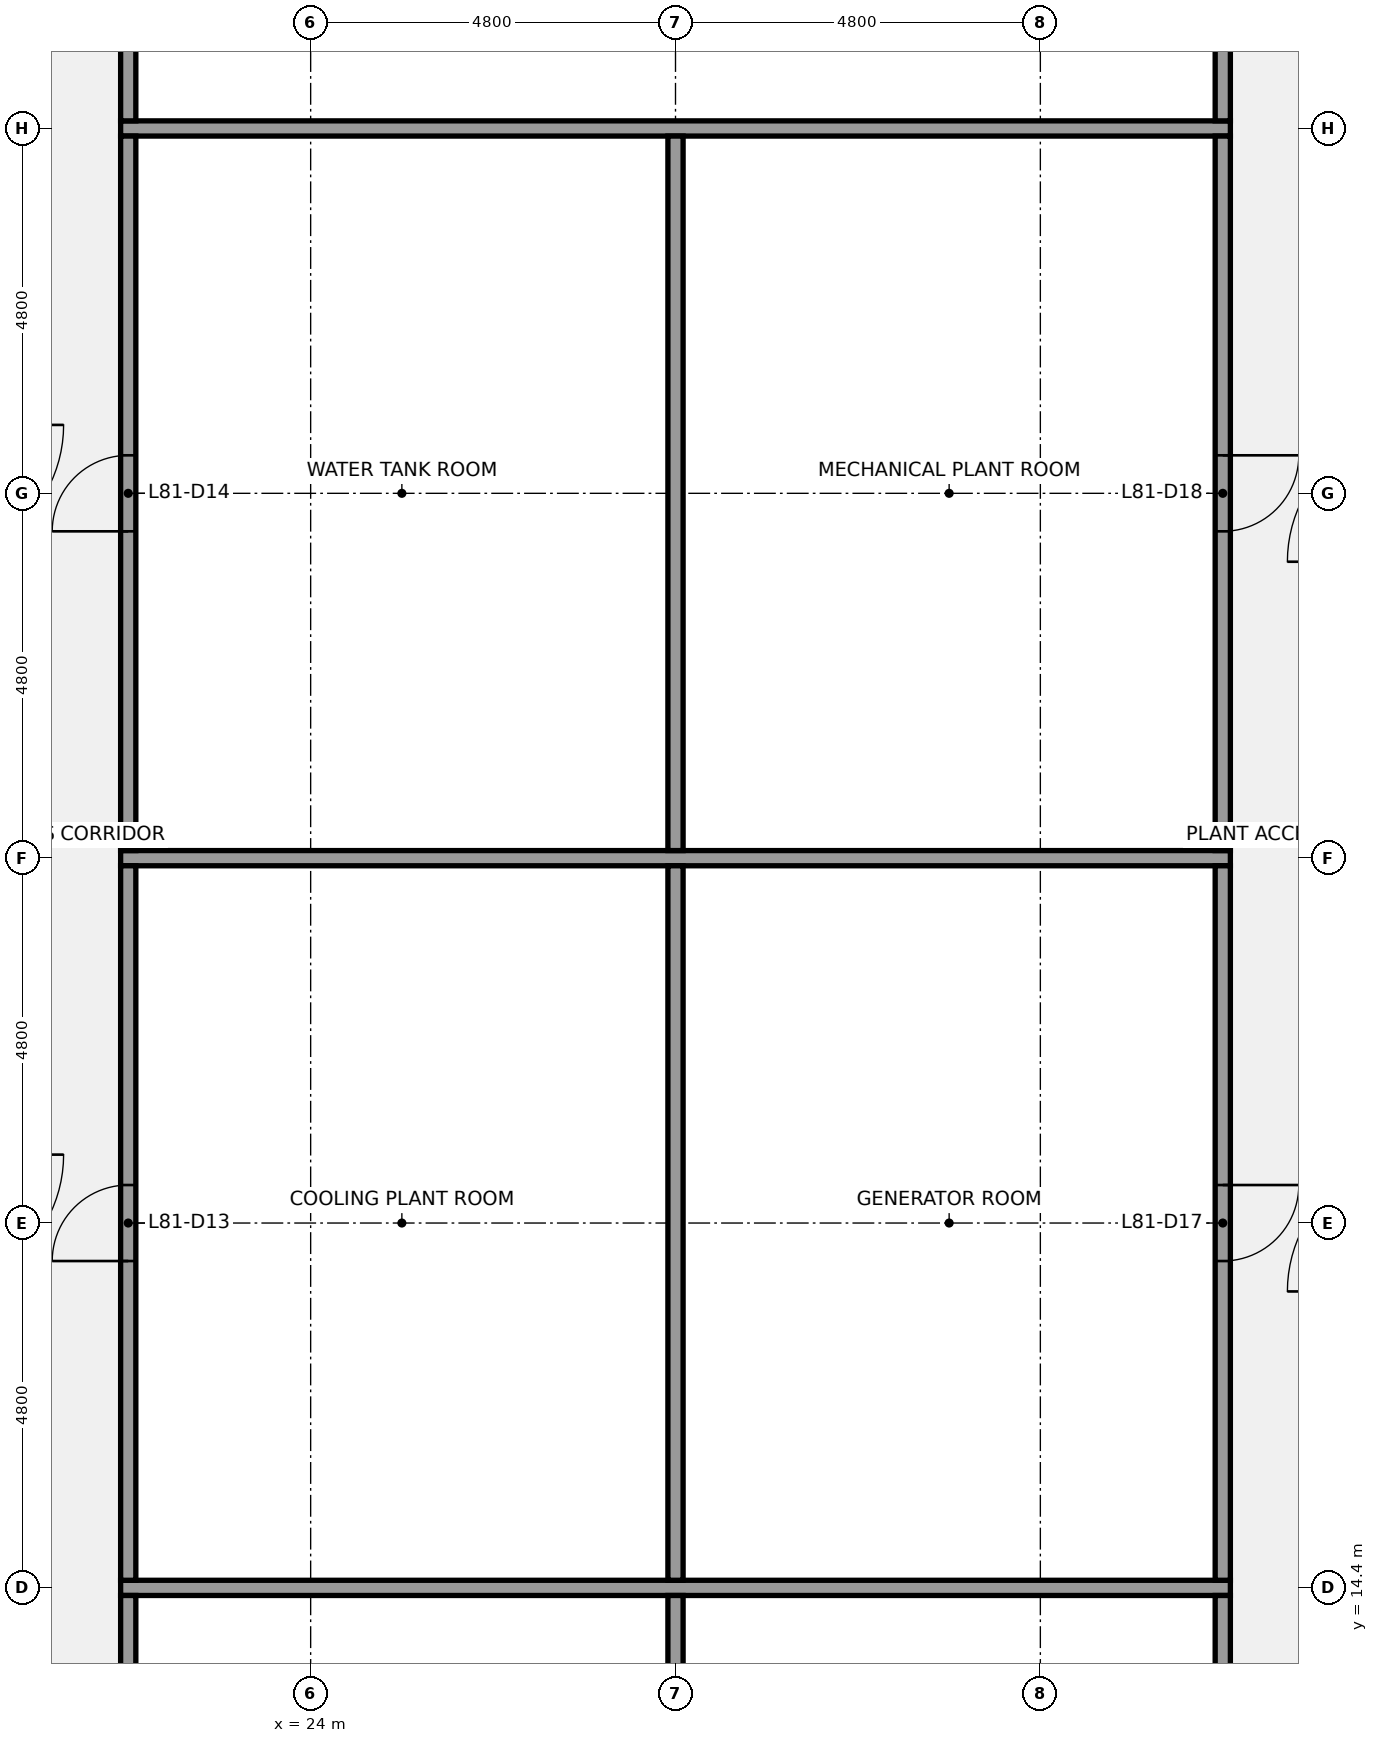
"""IFC4 building model, lengths in metres.
Left out: names, types, materials, properties, quantities, classifications, styles, units other than length and angle.
Written with IfcOpenShell. Run it as: python <this file> out.ifc"""

import sys

from ifc_helpers import new_model, si_unit, direction, frame, frame_2d, origin, place, context, subcontext, project, spatial, rectangle, extrude, element, fill, save


model = new_model("IFC4")
c1 = context("Model", 3, precision=1e-05, world=origin(), true_north=direction((0.0, 1.0)))
c2 = subcontext(c1, "Body", "Model", "MODEL_VIEW")
j1 = project(units=[si_unit("LENGTHUNIT", "METRE"), si_unit("PLANEANGLEUNIT", "RADIAN")], contexts=[c1])
p1 = place(None, origin())
s1 = spatial("IfcSite", under=j1, at=p1, CompositionType="ELEMENT")
p2 = place(p1, origin())
s2 = spatial("IfcBuilding", under=s1, at=p2, CompositionType="ELEMENT")
p3 = place(p2, frame((0.0, 0.0, 362.3)))
s3 = spatial("IfcBuildingStorey", under=s2, at=p3, CompositionType="ELEMENT", Elevation=362.3)
for number, where, z_axis, x_axis in (
    (1, (21.5, 14.4, 0.0), (0.0, 0.0, 1.0), (1.0, 0.0, 0.0)),
    (2, (21.5, 24.0, 0.0), (0.0, 0.0, 1.0), (1.0, 0.0, 0.0)),
    (3, (21.5, 33.6, 0.0), (0.0, 0.0, 1.0), (1.0, 0.0, 0.0)),
):
    element("IfcWall", number, at=place(p3, frame(where, z_axis=z_axis, x_axis=x_axis)), inside=s3, PredefinedType="PARTITIONING", context=c2, shape_type="SweptSolid", body=[
        extrude(rectangle(XDim=14.6, YDim=0.2, at=frame_2d((7.3, 0.0))), origin(), (0.0, 0.0, 1.0), 2.759),
    ])
p4 = place(p3, frame((21.6, 7.3, 0.0), z_axis=(0.0, 0.0, 1.0), x_axis=(0.0, 1.0, 0.0)))
e4 = element("IfcWall", 4, at=p4, inside=s3, PredefinedType="PARTITIONING", context=c2, shape_type="SweptSolid", body=[
    extrude(rectangle(XDim=7.0, YDim=0.2, at=frame_2d((3.5, 0.0))), origin(), (0.0, 0.0, 1.0), 2.759),
])
p5 = place(p4, frame((3.0, 0.0, 0.0)))
e5 = element("IfcOpeningElement", 5, at=p5, cuts=e4, PredefinedType="OPENING", context=c2, shape_type="SweptSolid", body=[
    extrude(rectangle(XDim=1.0, YDim=2.1, at=frame_2d((0.5, 1.05))), frame((0.0, 0.11, 0.0), z_axis=(0.0, -1.0, 0.0), x_axis=(1.0, 0.0, 0.0)), (0.0, 0.0, 1.0), 0.22),
])
p6 = place(p3, frame((21.6, 14.5, 0.0), z_axis=(0.0, 0.0, 1.0), x_axis=(0.0, 1.0, 0.0)))
e6 = element("IfcWall", 6, at=p6, inside=s3, PredefinedType="PARTITIONING", context=c2, shape_type="SweptSolid", body=[
    extrude(rectangle(XDim=9.4, YDim=0.2, at=frame_2d((4.7, 0.0))), origin(), (0.0, 0.0, 1.0), 2.759),
])
p7 = place(p6, frame((4.2, 0.0, 0.0)))
e7 = element("IfcOpeningElement", 7, at=p7, cuts=e6, PredefinedType="OPENING", context=c2, shape_type="SweptSolid", body=[
    extrude(rectangle(XDim=1.0, YDim=2.1, at=frame_2d((0.5, 1.05))), frame((0.0, 0.11, 0.0), z_axis=(0.0, -1.0, 0.0), x_axis=(1.0, 0.0, 0.0)), (0.0, 0.0, 1.0), 0.22),
])
p8 = place(p3, frame((21.6, 24.1, 0.0), z_axis=(0.0, 0.0, 1.0), x_axis=(0.0, 1.0, 0.0)))
e8 = element("IfcWall", 8, at=p8, inside=s3, PredefinedType="PARTITIONING", context=c2, shape_type="SweptSolid", body=[
    extrude(rectangle(XDim=9.4, YDim=0.2, at=frame_2d((4.7, 0.0))), origin(), (0.0, 0.0, 1.0), 2.759),
])
p9 = place(p8, frame((4.2, 0.0, 0.0)))
e9 = element("IfcOpeningElement", 9, at=p9, cuts=e8, PredefinedType="OPENING", context=c2, shape_type="SweptSolid", body=[
    extrude(rectangle(XDim=1.0, YDim=2.1, at=frame_2d((0.5, 1.05))), frame((0.0, 0.11, 0.0), z_axis=(0.0, -1.0, 0.0), x_axis=(1.0, 0.0, 0.0)), (0.0, 0.0, 1.0), 0.22),
])
p10 = place(p3, frame((21.6, 33.7, 0.0), z_axis=(0.0, 0.0, 1.0), x_axis=(0.0, 1.0, 0.0)))
e10 = element("IfcWall", 10, at=p10, inside=s3, PredefinedType="PARTITIONING", context=c2, shape_type="SweptSolid", body=[
    extrude(rectangle(XDim=4.6, YDim=0.2, at=frame_2d((2.3, 0.0))), origin(), (0.0, 0.0, 1.0), 2.759),
])
p11 = place(p10, frame((1.8, 0.0, 0.0)))
e11 = element("IfcOpeningElement", 11, at=p11, cuts=e10, PredefinedType="OPENING", context=c2, shape_type="SweptSolid", body=[
    extrude(rectangle(XDim=1.0, YDim=2.1, at=frame_2d((0.5, 1.05))), frame((0.0, 0.11, 0.0), z_axis=(0.0, -1.0, 0.0), x_axis=(1.0, 0.0, 0.0)), (0.0, 0.0, 1.0), 0.22),
])
p12 = place(p3, frame((28.8, 7.3, 0.0), z_axis=(0.0, 0.0, 1.0), x_axis=(0.0, 1.0, 0.0)))
e12 = element("IfcWall", 12, at=p12, inside=s3, PredefinedType="PARTITIONING", context=c2, shape_type="SweptSolid", body=[
    extrude(rectangle(XDim=7.0, YDim=0.2, at=frame_2d((3.5, 0.0))), origin(), (0.0, 0.0, 1.0), 2.759),
])
for number, where, z_axis, x_axis in (
    (13, (28.8, 14.5, 0.0), (0.0, 0.0, 1.0), (0.0, 1.0, 0.0)),
    (14, (28.8, 24.1, 0.0), (0.0, 0.0, 1.0), (0.0, 1.0, 0.0)),
):
    element("IfcWall", number, at=place(p3, frame(where, z_axis=z_axis, x_axis=x_axis)), inside=s3, PredefinedType="PARTITIONING", context=c2, shape_type="SweptSolid", body=[
        extrude(rectangle(XDim=9.4, YDim=0.2, at=frame_2d((4.7, 0.0))), origin(), (0.0, 0.0, 1.0), 2.759),
    ])
p13 = place(p3, frame((36.0, 7.3, 0.0), z_axis=(0.0, 0.0, 1.0), x_axis=(0.0, 1.0, 0.0)))
e15 = element("IfcWall", 15, at=p13, inside=s3, PredefinedType="PARTITIONING", context=c2, shape_type="SweptSolid", body=[
    extrude(rectangle(XDim=7.0, YDim=0.2, at=frame_2d((3.5, 0.0))), origin(), (0.0, 0.0, 1.0), 2.759),
])
p14 = place(p13, frame((3.0, 0.0, 0.0)))
e16 = element("IfcOpeningElement", 16, at=p14, cuts=e15, PredefinedType="OPENING", context=c2, shape_type="SweptSolid", body=[
    extrude(rectangle(XDim=1.0, YDim=2.1, at=frame_2d((0.5, 1.05))), frame((0.0, 0.11, 0.0), z_axis=(0.0, -1.0, 0.0), x_axis=(1.0, 0.0, 0.0)), (0.0, 0.0, 1.0), 0.22),
])
p15 = place(p3, frame((36.0, 14.5, 0.0), z_axis=(0.0, 0.0, 1.0), x_axis=(0.0, 1.0, 0.0)))
e17 = element("IfcWall", 17, at=p15, inside=s3, PredefinedType="PARTITIONING", context=c2, shape_type="SweptSolid", body=[
    extrude(rectangle(XDim=9.4, YDim=0.2, at=frame_2d((4.7, 0.0))), origin(), (0.0, 0.0, 1.0), 2.759),
])
p16 = place(p15, frame((4.2, 0.0, 0.0)))
e18 = element("IfcOpeningElement", 18, at=p16, cuts=e17, PredefinedType="OPENING", context=c2, shape_type="SweptSolid", body=[
    extrude(rectangle(XDim=1.0, YDim=2.1, at=frame_2d((0.5, 1.05))), frame((0.0, 0.11, 0.0), z_axis=(0.0, -1.0, 0.0), x_axis=(1.0, 0.0, 0.0)), (0.0, 0.0, 1.0), 0.22),
])
p17 = place(p3, frame((36.0, 24.1, 0.0), z_axis=(0.0, 0.0, 1.0), x_axis=(0.0, 1.0, 0.0)))
e19 = element("IfcWall", 19, at=p17, inside=s3, PredefinedType="PARTITIONING", context=c2, shape_type="SweptSolid", body=[
    extrude(rectangle(XDim=9.4, YDim=0.2, at=frame_2d((4.7, 0.0))), origin(), (0.0, 0.0, 1.0), 2.759),
])
p18 = place(p17, frame((4.2, 0.0, 0.0)))
e20 = element("IfcOpeningElement", 20, at=p18, cuts=e19, PredefinedType="OPENING", context=c2, shape_type="SweptSolid", body=[
    extrude(rectangle(XDim=1.0, YDim=2.1, at=frame_2d((0.5, 1.05))), frame((0.0, 0.11, 0.0), z_axis=(0.0, -1.0, 0.0), x_axis=(1.0, 0.0, 0.0)), (0.0, 0.0, 1.0), 0.22),
])
p19 = place(p3, frame((36.0, 33.7, 0.0), z_axis=(0.0, 0.0, 1.0), x_axis=(0.0, 1.0, 0.0)))
e21 = element("IfcWall", 21, at=p19, inside=s3, PredefinedType="PARTITIONING", context=c2, shape_type="SweptSolid", body=[
    extrude(rectangle(XDim=4.6, YDim=0.2, at=frame_2d((2.3, 0.0))), origin(), (0.0, 0.0, 1.0), 2.759),
])
p20 = place(p7, origin())
e22 = element("IfcDoor", 22, at=p20, inside=s3, OperationType="SINGLE_SWING_LEFT", PredefinedType="DOOR", context=c2, shape_type="SweptSolid", body=[
    extrude(rectangle(XDim=1.0, YDim=2.1, at=frame_2d((0.5, 1.05))), frame((0.0, 0.025, 0.0), z_axis=(0.0, -1.0, 0.0), x_axis=(1.0, 0.0, 0.0)), (0.0, 0.0, 1.0), 0.05),
])
fill(e7, e22)
p21 = place(p9, origin())
e23 = element("IfcDoor", 23, at=p21, inside=s3, OperationType="SINGLE_SWING_LEFT", PredefinedType="DOOR", context=c2, shape_type="SweptSolid", body=[
    extrude(rectangle(XDim=1.0, YDim=2.1, at=frame_2d((0.5, 1.05))), frame((0.0, 0.025, 0.0), z_axis=(0.0, -1.0, 0.0), x_axis=(1.0, 0.0, 0.0)), (0.0, 0.0, 1.0), 0.05),
])
fill(e9, e23)
p22 = place(p16, origin())
e24 = element("IfcDoor", 24, at=p22, inside=s3, OperationType="SINGLE_SWING_RIGHT", PredefinedType="DOOR", context=c2, shape_type="SweptSolid", body=[
    extrude(rectangle(XDim=1.0, YDim=2.1, at=frame_2d((0.5, 1.05))), frame((0.0, 0.025, 0.0), z_axis=(0.0, -1.0, 0.0), x_axis=(1.0, 0.0, 0.0)), (0.0, 0.0, 1.0), 0.05),
])
fill(e18, e24)
p23 = place(p18, origin())
e25 = element("IfcDoor", 25, at=p23, inside=s3, OperationType="SINGLE_SWING_RIGHT", PredefinedType="DOOR", context=c2, shape_type="SweptSolid", body=[
    extrude(rectangle(XDim=1.0, YDim=2.1, at=frame_2d((0.5, 1.05))), frame((0.0, 0.025, 0.0), z_axis=(0.0, -1.0, 0.0), x_axis=(1.0, 0.0, 0.0)), (0.0, 0.0, 1.0), 0.05),
])
fill(e20, e25)
save(model, sys.argv[1])
